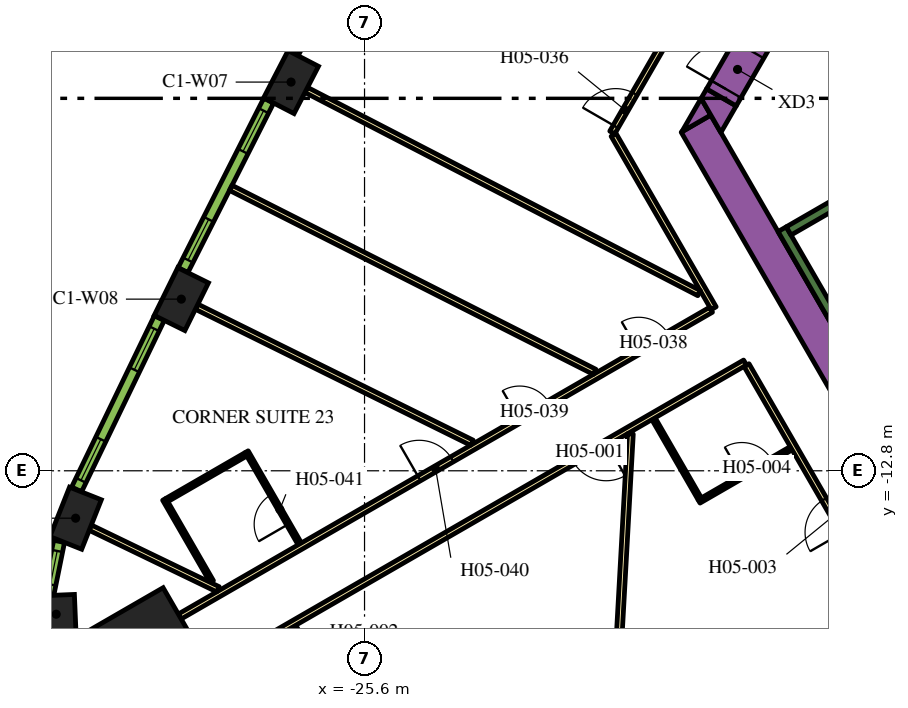
"""IFC4 building model, lengths in metres.
Left out: names, types, materials, properties, quantities, classifications, styles, units other than length and angle.
Written with IfcOpenShell. Run it as: python <this file> out.ifc"""

import sys

from ifc_helpers import new_model, si_unit, direction, frame, frame_2d, origin, origin_2d, place, context, subcontext, project, spatial, polyline, rectangle, outline, extrude, element, fill, save


model = new_model("IFC4")
c1 = context("Model", 3, precision=1e-05, world=origin(), true_north=direction((0.0, 1.0)))
c2 = subcontext(c1, "Body", "Model", "MODEL_VIEW")
j1 = project(units=[si_unit("LENGTHUNIT", "METRE"), si_unit("PLANEANGLEUNIT", "RADIAN")], contexts=[c1])
p1 = place(None, origin())
s1 = spatial("IfcSite", under=j1, at=p1, CompositionType="ELEMENT")
p2 = place(p1, origin())
s2 = spatial("IfcBuilding", under=s1, at=p2, CompositionType="ELEMENT")
p3 = place(p2, frame((0.0, 0.0, 74.4)))
s3 = spatial("IfcBuildingStorey", under=s2, at=p3, CompositionType="ELEMENT", Elevation=74.4)
p4 = place(p3, frame((-31.522, -18.199, 0.0), z_axis=(0.0, 0.0, 1.0), x_axis=(-0.866025403784, -0.5, 0.0)))
e1 = element("IfcColumn", 1, at=p4, inside=s3, PredefinedType="COLUMN", context=c2, shape_type="SweptSolid", body=[
    extrude(rectangle(XDim=3.4, YDim=3.4, at=origin_2d()), origin(), (0.0, 0.0, 1.0), 3.9),
])
for number, where, z_axis, x_axis in (
    (2, (-27.533, -2.572, 0.0), (0.0, 0.0, 1.0), (-0.459, -0.888, 0.0)),
    (3, (-30.421, -8.284, 0.0), (0.0, 0.0, 1.0), (-0.443, -0.897, 0.0)),
    (4, (-33.203, -14.047, 0.0), (0.0, 0.0, 1.0), (-0.369, -0.929, 0.0)),
):
    element("IfcColumn", number, at=place(p3, frame(where, z_axis=z_axis, x_axis=x_axis)), inside=s3, PredefinedType="COLUMN", context=c2, shape_type="SweptSolid", body=[
        extrude(rectangle(XDim=1.4, YDim=0.9, at=origin_2d()), origin(), (0.0, 0.0, 1.0), 3.9),
    ])
p5 = place(p3, frame((-33.713, -16.574, 0.0), z_axis=(0.0, 0.0, 1.0), x_axis=(0.041582693819, -0.999135065732, 0.0)))
e5 = element("IfcColumn", 5, at=p5, inside=s3, PredefinedType="COLUMN", context=c2, shape_type="SweptSolid", body=[
    extrude(rectangle(XDim=1.0, YDim=1.0, at=origin_2d()), origin(), (0.0, 0.0, 1.0), 3.9),
])
p6 = place(p3, frame((-12.134, -11.883, 0.0), z_axis=(0.0, 0.0, 1.0), x_axis=(-0.500005339912, 0.866022320763, 0.0)))
e6 = element("IfcWall", 6, at=p6, inside=s3, PredefinedType="SOLIDWALL", context=c2, shape_type="SweptSolid", body=[
    extrude(rectangle(XDim=9.488, YDim=0.9, at=frame_2d((4.744, 0.0))), origin(), (0.0, 0.0, 1.0), 3.9),
])
p7 = place(p3, origin())
e7 = element("IfcWall", 7, at=p7, inside=s3, PredefinedType="SOLIDWALL", context=c2, shape_type="SweptSolid", body=[
    extrude(outline(polyline([(-16.489, -3.44), (-17.251, -3.88), (-16.743, -3.0), (-16.489, -3.44)])), origin(), (0.0, 0.0, 1.0), 3.9),
])
e8 = element("IfcWall", 8, at=p7, inside=s3, PredefinedType="SOLIDWALL", context=c2, shape_type="SweptSolid", body=[
    extrude(outline(polyline([(-15.82, -3.201), (-16.223, -3.9), (-16.743, -3.0), (-16.599, -2.751), (-15.82, -3.201)])), origin(), (0.0, 0.0, 1.0), 3.9),
])
p8 = place(p3, frame((-12.885, -9.431, 0.0), z_axis=(0.0, 0.0, 1.0), x_axis=(-0.500020560727, 0.866013532718, 0.0)))
e9 = element("IfcWall", 9, at=p8, inside=s3, PredefinedType="SOLIDWALL", context=c2, shape_type="SweptSolid", body=[
    extrude(rectangle(XDim=3.45, YDim=0.25, at=frame_2d((1.725, 0.0))), origin(), (0.0, 0.0, 1.0), 3.9),
])
p9 = place(p3, frame((-14.44, -6.49, 0.0), z_axis=(0.0, 0.0, 1.0), x_axis=(0.866022966069, 0.500004222222, 0.0)))
e10 = element("IfcWall", 10, at=p9, inside=s3, PredefinedType="SOLIDWALL", context=c2, shape_type="SweptSolid", body=[
    extrude(rectangle(XDim=6.8, YDim=0.25, at=frame_2d((3.4, 0.0))), origin(), (0.0, 0.0, 1.0), 3.9),
])
p10 = place(p3, frame((-16.209, -2.976, 0.0), z_axis=(0.0, 0.0, 1.0), x_axis=(0.499954529098, 0.86605165483, 0.0)))
e11 = element("IfcWall", 11, at=p10, inside=s3, PredefinedType="SOLIDWALL", context=c2, shape_type="SweptSolid", body=[
    extrude(rectangle(XDim=1.7, YDim=0.9, at=frame_2d((0.85, 0.0))), origin(), (0.0, 0.0, 1.0), 3.9),
])
p11 = place(p10, frame((0.25, 0.0, 0.0)))
e12 = element("IfcOpeningElement", 12, at=p11, cuts=e11, PredefinedType="OPENING", context=c2, shape_type="SweptSolid", body=[
    extrude(rectangle(XDim=1.2, YDim=2.1, at=frame_2d((0.6, 1.05))), frame((0.0, 0.46, 0.0), z_axis=(0.0, -1.0, 0.0), x_axis=(1.0, 0.0, 0.0)), (0.0, 0.0, 1.0), 0.92),
])
p12 = place(p3, frame((-19.081, -3.9, 0.0), z_axis=(0.0, 0.0, 1.0), x_axis=(0.499998313975, 0.866026377209, 0.0)))
e13 = element("IfcWall", 13, at=p12, inside=s3, PredefinedType="PARTITIONING", context=c2, shape_type="SweptSolid", body=[
    extrude(rectangle(XDim=25.766, YDim=0.15, at=frame_2d((12.883, 0.0))), origin(), (0.0, 0.0, 1.0), 2.7),
])
p13 = place(p12, frame((24.265, 0.0, 0.0)))
e14 = element("IfcOpeningElement", 14, at=p13, cuts=e13, PredefinedType="OPENING", context=c2, shape_type="SweptSolid", body=[
    extrude(rectangle(XDim=1.0, YDim=2.1, at=frame_2d((0.5, 1.05))), frame((0.0, 0.085, 0.0), z_axis=(0.0, -1.0, 0.0), x_axis=(1.0, 0.0, 0.0)), (0.0, 0.0, 1.0), 0.17),
])
p14 = place(p12, frame((13.146, 0.0, 0.0)))
e15 = element("IfcOpeningElement", 15, at=p14, cuts=e13, PredefinedType="OPENING", context=c2, shape_type="SweptSolid", body=[
    extrude(rectangle(XDim=1.1, YDim=2.1, at=frame_2d((0.55, 1.05))), frame((0.0, 0.085, 0.0), z_axis=(0.0, -1.0, 0.0), x_axis=(1.0, 0.0, 0.0)), (0.0, 0.0, 1.0), 0.17),
])
p15 = place(p12, frame((11.693, 0.0, 0.0)))
e16 = element("IfcOpeningElement", 16, at=p15, cuts=e13, PredefinedType="OPENING", context=c2, shape_type="SweptSolid", body=[
    extrude(rectangle(XDim=1.0, YDim=2.1, at=frame_2d((0.5, 1.05))), frame((0.0, 0.085, 0.0), z_axis=(0.0, -1.0, 0.0), x_axis=(1.0, 0.0, 0.0)), (0.0, 0.0, 1.0), 0.17),
])
p16 = place(p12, frame((0.18, 0.0, 0.0)))
e17 = element("IfcOpeningElement", 17, at=p16, cuts=e13, PredefinedType="OPENING", context=c2, shape_type="SweptSolid", body=[
    extrude(rectangle(XDim=1.0, YDim=2.1, at=frame_2d((0.5, 1.05))), frame((0.0, 0.085, 0.0), z_axis=(0.0, -1.0, 0.0), x_axis=(1.0, 0.0, 0.0)), (0.0, 0.0, 1.0), 0.17),
])
p17 = place(p3, frame((-16.412, -8.523, 0.0), z_axis=(0.0, 0.0, 1.0), x_axis=(-0.500001929737, 0.866024289647, 0.0)))
e18 = element("IfcWall", 18, at=p17, inside=s3, PredefinedType="PARTITIONING", context=c2, shape_type="SweptSolid", body=[
    extrude(rectangle(XDim=5.268, YDim=0.15, at=frame_2d((2.634, 0.0))), origin(), (0.0, 0.0, 1.0), 2.7),
])
p18 = place(p3, frame((-30.463, -16.635, 0.0), z_axis=(0.0, 0.0, 1.0), x_axis=(0.866022394896, 0.500005211512, 0.0)))
e19 = element("IfcWall", 19, at=p18, inside=s3, PredefinedType="PARTITIONING", context=c2, shape_type="SweptSolid", body=[
    extrude(rectangle(XDim=16.144, YDim=0.15, at=frame_2d((8.072, 0.0))), origin(), (0.0, 0.0, 1.0), 2.7),
])
p19 = place(p18, frame((13.948, 0.0, 0.0)))
e20 = element("IfcOpeningElement", 20, at=p19, cuts=e19, PredefinedType="OPENING", context=c2, shape_type="SweptSolid", body=[
    extrude(rectangle(XDim=0.9, YDim=2.1, at=frame_2d((0.45, 1.05))), frame((0.0, 0.085, 0.0), z_axis=(0.0, -1.0, 0.0), x_axis=(1.0, 0.0, 0.0)), (0.0, 0.0, 1.0), 0.17),
])
p20 = place(p18, frame((10.329, 0.0, 0.0)))
e21 = element("IfcOpeningElement", 21, at=p20, cuts=e19, PredefinedType="OPENING", context=c2, shape_type="SweptSolid", body=[
    extrude(rectangle(XDim=0.9, YDim=2.1, at=frame_2d((0.45, 1.05))), frame((0.0, 0.085, 0.0), z_axis=(0.0, -1.0, 0.0), x_axis=(1.0, 0.0, 0.0)), (0.0, 0.0, 1.0), 0.17),
])
p21 = place(p18, frame((7.275, 0.0, 0.0)))
e22 = element("IfcOpeningElement", 22, at=p21, cuts=e19, PredefinedType="OPENING", context=c2, shape_type="SweptSolid", body=[
    extrude(rectangle(XDim=1.0, YDim=2.1, at=frame_2d((0.5, 1.05))), frame((0.0, 0.085, 0.0), z_axis=(0.0, -1.0, 0.0), x_axis=(1.0, 0.0, 0.0)), (0.0, 0.0, 1.0), 0.17),
])
p22 = place(p3, frame((-15.587, -9.952, 0.0), z_axis=(0.0, 0.0, 1.0), x_axis=(-0.866022197818, -0.500005552856, 0.0)))
e23 = element("IfcWall", 23, at=p22, inside=s3, PredefinedType="PARTITIONING", context=c2, shape_type="SweptSolid", body=[
    extrude(rectangle(XDim=16.224, YDim=0.15, at=frame_2d((8.112, 0.0))), origin(), (0.0, 0.0, 1.0), 2.7),
])
p23 = place(p22, frame((4.22, 0.0, 0.0)))
e24 = element("IfcOpeningElement", 24, at=p23, cuts=e23, PredefinedType="OPENING", context=c2, shape_type="SweptSolid", body=[
    extrude(rectangle(XDim=1.0, YDim=2.1, at=frame_2d((0.5, 1.05))), frame((0.0, 0.085, 0.0), z_axis=(0.0, -1.0, 0.0), x_axis=(1.0, 0.0, 0.0)), (0.0, 0.0, 1.0), 0.17),
])
p24 = place(p3, frame((-12.918, -14.575, 0.0), z_axis=(0.0, 0.0, 1.0), x_axis=(-0.500009150678, 0.866020120573, 0.0)))
e25 = element("IfcWall", 25, at=p24, inside=s3, PredefinedType="PARTITIONING", context=c2, shape_type="SweptSolid", body=[
    extrude(rectangle(XDim=5.258, YDim=0.15, at=frame_2d((2.629, 0.0))), origin(), (0.0, 0.0, 1.0), 2.7),
])
p25 = place(p24, frame((0.18, 0.0, 0.0)))
e26 = element("IfcOpeningElement", 26, at=p25, cuts=e25, PredefinedType="OPENING", context=c2, shape_type="SweptSolid", body=[
    extrude(rectangle(XDim=1.0, YDim=2.1, at=frame_2d((0.5, 1.05))), frame((0.0, 0.085, 0.0), z_axis=(0.0, -1.0, 0.0), x_axis=(1.0, 0.0, 0.0)), (0.0, 0.0, 1.0), 0.17),
])
p26 = place(p3, frame((-32.817, -14.296, 0.0), z_axis=(0.0, 0.0, 1.0), x_axis=(0.900616957918, -0.434613730927, 0.0)))
e27 = element("IfcWall", 27, at=p26, inside=s3, PredefinedType="PARTITIONING", context=c2, shape_type="SweptSolid", body=[
    extrude(rectangle(XDim=3.733, YDim=0.15, at=frame_2d((1.867, 0.0))), origin(), (0.0, 0.0, 1.0), 2.7),
])
p27 = place(p3, frame((-30.018, -8.483, 0.0), z_axis=(0.0, 0.0, 1.0), x_axis=(0.896544505264, -0.44295366584, 0.0)))
e28 = element("IfcWall", 28, at=p27, inside=s3, PredefinedType="PARTITIONING", context=c2, shape_type="SweptSolid", body=[
    extrude(rectangle(XDim=8.079, YDim=0.15, at=frame_2d((4.04, 0.0))), origin(), (0.0, 0.0, 1.0), 2.7),
])
p28 = place(p3, frame((-29.12, -5.356, 0.0), z_axis=(0.0, 0.0, 1.0), x_axis=(0.892401965553, -0.451241323327, 0.0)))
e29 = element("IfcWall", 29, at=p28, inside=s3, PredefinedType="PARTITIONING", context=c2, shape_type="SweptSolid", body=[
    extrude(rectangle(XDim=10.729, YDim=0.15, at=frame_2d((5.364, 0.0))), origin(), (0.0, 0.0, 1.0), 2.7),
])
p29 = place(p3, frame((-19.198, -22.541, 0.0), z_axis=(0.0, 0.0, 1.0), x_axis=(0.055432210572, 0.99846245299, 0.0)))
e30 = element("IfcWall", 30, at=p29, inside=s3, PredefinedType="PARTITIONING", context=c2, shape_type="SweptSolid", body=[
    extrude(rectangle(XDim=10.729, YDim=0.15, at=frame_2d((5.365, 0.0))), origin(), (0.0, 0.0, 1.0), 2.7),
])
p30 = place(p3, frame((-27.134, -2.779, 0.0), z_axis=(0.0, 0.0, 1.0), x_axis=(0.8882049501, -0.459447457951, 0.0)))
e31 = element("IfcWall", 31, at=p30, inside=s3, PredefinedType="PARTITIONING", context=c2, shape_type="SweptSolid", body=[
    extrude(rectangle(XDim=11.638, YDim=0.15, at=frame_2d((5.819, 0.0))), origin(), (0.0, 0.0, 1.0), 2.7),
])
p31 = place(p3, frame((-26.052, -19.314, 0.0), z_axis=(0.0, 0.0, 1.0), x_axis=(-0.49998411664, 0.866034573852, 0.0)))
e32 = element("IfcWall", 32, at=p31, inside=s3, PredefinedType="PARTITIONING", context=c2, shape_type="SweptSolid", body=[
    extrude(rectangle(XDim=2.8, YDim=0.1, at=frame_2d((1.4, 0.0))), origin(), (0.0, 0.0, 1.0), 2.7),
])
p32 = place(p31, frame((1.3, 0.0, 0.0)))
e33 = element("IfcOpeningElement", 33, at=p32, cuts=e32, PredefinedType="OPENING", context=c2, shape_type="SweptSolid", body=[
    extrude(rectangle(XDim=0.9, YDim=2.1, at=frame_2d((0.45, 1.05))), frame((0.0, 0.06, 0.0), z_axis=(0.0, -1.0, 0.0), x_axis=(1.0, 0.0, 0.0)), (0.0, 0.0, 1.0), 0.12),
])
p33 = place(p3, frame((-16.797, -13.606, 0.0), z_axis=(0.0, 0.0, 1.0), x_axis=(0.866034573852, 0.49998411664, 0.0)))
e34 = element("IfcWall", 34, at=p33, inside=s3, PredefinedType="PARTITIONING", context=c2, shape_type="SweptSolid", body=[
    extrude(rectangle(XDim=2.8, YDim=0.1, at=frame_2d((1.4, 0.0))), origin(), (0.0, 0.0, 1.0), 2.7),
])
p34 = place(p33, frame((1.3, 0.0, 0.0)))
e35 = element("IfcOpeningElement", 35, at=p34, cuts=e34, PredefinedType="OPENING", context=c2, shape_type="SweptSolid", body=[
    extrude(rectangle(XDim=0.9, YDim=2.1, at=frame_2d((0.45, 1.05))), frame((0.0, 0.06, 0.0), z_axis=(0.0, -1.0, 0.0), x_axis=(1.0, 0.0, 0.0)), (0.0, 0.0, 1.0), 0.12),
])
p35 = place(p3, frame((-16.779, -13.538, 0.0), z_axis=(0.0, 0.0, 1.0), x_axis=(-0.500061642096, 0.865989811779, 0.0)))
e36 = element("IfcWall", 36, at=p35, inside=s3, PredefinedType="PARTITIONING", context=c2, shape_type="SweptSolid", body=[
    extrude(rectangle(XDim=2.43, YDim=0.1, at=frame_2d((1.215, 0.0))), origin(), (0.0, 0.0, 1.0), 2.7),
])
p36 = place(p3, frame((-27.304, -14.725, 0.0), z_axis=(0.0, 0.0, 1.0), x_axis=(-0.49998411664, 0.866034573852, 0.0)))
e37 = element("IfcWall", 37, at=p36, inside=s3, PredefinedType="PARTITIONING", context=c2, shape_type="SweptSolid", body=[
    extrude(rectangle(XDim=2.8, YDim=0.1, at=frame_2d((1.4, 0.0))), origin(), (0.0, 0.0, 1.0), 2.7),
])
p37 = place(p36, frame((0.6, 0.0, 0.0)))
e38 = element("IfcOpeningElement", 38, at=p37, cuts=e37, PredefinedType="OPENING", context=c2, shape_type="SweptSolid", body=[
    extrude(rectangle(XDim=0.9, YDim=2.1, at=frame_2d((0.45, 1.05))), frame((0.0, 0.06, 0.0), z_axis=(0.0, -1.0, 0.0), x_axis=(1.0, 0.0, 0.0)), (0.0, 0.0, 1.0), 0.12),
])
p38 = place(p3, frame((-28.722, -12.368, 0.0), z_axis=(0.0, 0.0, 1.0), x_axis=(-0.866050077142, -0.499957262057, 0.0)))
e39 = element("IfcWall", 39, at=p38, inside=s3, PredefinedType="PARTITIONING", context=c2, shape_type="SweptSolid", body=[
    extrude(rectangle(XDim=2.4, YDim=0.1, at=frame_2d((1.2, 0.0))), origin(), (0.0, 0.0, 1.0), 2.7),
])
p39 = place(p3, frame((-29.619, -15.715, 0.0), z_axis=(0.0, 0.0, 1.0), x_axis=(-0.500004234368, 0.866022959057, 0.0)))
e40 = element("IfcWall", 40, at=p39, inside=s3, PredefinedType="PARTITIONING", context=c2, shape_type="SweptSolid", body=[
    extrude(rectangle(XDim=2.5, YDim=0.1, at=frame_2d((1.25, 0.0))), origin(), (0.0, 0.0, 1.0), 2.7),
])
p40 = place(p3, frame((-25.138, 2.608, 0.0), z_axis=(0.0, 0.0, 1.0), x_axis=(-0.467629620899, -0.883924509026, 0.0)))
e41 = element("IfcWall", 41, at=p40, inside=s3, PredefinedType="SOLIDWALL", context=c2, shape_type="SweptSolid", body=[
    extrude(rectangle(XDim=4.998, YDim=0.29, at=frame_2d((2.499, 0.0))), origin(), (0.0, 0.0, 1.0), 3.6),
])
p41 = place(p40, frame((0.297, 0.0, 0.9)))
e42 = element("IfcOpeningElement", 42, at=p41, cuts=e41, PredefinedType="OPENING", context=c2, shape_type="SweptSolid", body=[
    extrude(rectangle(XDim=1.2, YDim=2.15, at=frame_2d((0.6, 1.075))), frame((0.0, 0.155, 0.0), z_axis=(0.0, -1.0, 0.0), x_axis=(1.0, 0.0, 0.0)), (0.0, 0.0, 1.0), 0.31),
])
p42 = place(p40, frame((3.501, 0.0, 0.9)))
e43 = element("IfcOpeningElement", 43, at=p42, cuts=e41, PredefinedType="OPENING", context=c2, shape_type="SweptSolid", body=[
    extrude(rectangle(XDim=1.2, YDim=2.15, at=frame_2d((0.6, 1.075))), frame((0.0, 0.155, 0.0), z_axis=(0.0, -1.0, 0.0), x_axis=(1.0, 0.0, 0.0)), (0.0, 0.0, 1.0), 0.31),
])
p43 = place(p3, frame((-28.122, -3.06, 0.0), z_axis=(0.0, 0.0, 1.0), x_axis=(-0.451233929645, -0.892405704115, 0.0)))
e44 = element("IfcWall", 44, at=p43, inside=s3, PredefinedType="SOLIDWALL", context=c2, shape_type="SweptSolid", body=[
    extrude(rectangle(XDim=4.998, YDim=0.29, at=frame_2d((2.499, 0.0))), origin(), (0.0, 0.0, 1.0), 3.6),
])
p44 = place(p43, frame((0.297, 0.0, 0.9)))
e45 = element("IfcOpeningElement", 45, at=p44, cuts=e44, PredefinedType="OPENING", context=c2, shape_type="SweptSolid", body=[
    extrude(rectangle(XDim=1.2, YDim=2.15, at=frame_2d((0.6, 1.075))), frame((0.0, 0.155, 0.0), z_axis=(0.0, -1.0, 0.0), x_axis=(1.0, 0.0, 0.0)), (0.0, 0.0, 1.0), 0.31),
])
p45 = place(p43, frame((3.501, 0.0, 0.9)))
e46 = element("IfcOpeningElement", 46, at=p45, cuts=e44, PredefinedType="OPENING", context=c2, shape_type="SweptSolid", body=[
    extrude(rectangle(XDim=1.2, YDim=2.15, at=frame_2d((0.6, 1.075))), frame((0.0, 0.155, 0.0), z_axis=(0.0, -1.0, 0.0), x_axis=(1.0, 0.0, 0.0)), (0.0, 0.0, 1.0), 0.31),
])
p46 = place(p3, frame((-31.0, -8.782, 0.0), z_axis=(0.0, 0.0, 1.0), x_axis=(-0.434664499056, -0.900592456808, 0.0)))
e47 = element("IfcWall", 47, at=p46, inside=s3, PredefinedType="SOLIDWALL", context=c2, shape_type="SweptSolid", body=[
    extrude(rectangle(XDim=5.006, YDim=0.29, at=frame_2d((2.503, 0.0))), origin(), (0.0, 0.0, 1.0), 3.6),
])
p47 = place(p46, frame((0.31, 0.0, 0.9)))
e48 = element("IfcOpeningElement", 48, at=p47, cuts=e47, PredefinedType="OPENING", context=c2, shape_type="SweptSolid", body=[
    extrude(rectangle(XDim=1.2, YDim=2.15, at=frame_2d((0.6, 1.075))), frame((0.0, 0.155, 0.0), z_axis=(0.0, -1.0, 0.0), x_axis=(1.0, 0.0, 0.0)), (0.0, 0.0, 1.0), 0.31),
])
p48 = place(p46, frame((3.541, 0.0, 0.9)))
e49 = element("IfcOpeningElement", 49, at=p48, cuts=e47, PredefinedType="OPENING", context=c2, shape_type="SweptSolid", body=[
    extrude(rectangle(XDim=1.2, YDim=2.15, at=frame_2d((0.6, 1.075))), frame((0.0, 0.155, 0.0), z_axis=(0.0, -1.0, 0.0), x_axis=(1.0, 0.0, 0.0)), (0.0, 0.0, 1.0), 0.31),
])
p49 = place(p3, frame((-33.637, -14.657, 0.0), z_axis=(0.0, 0.0, 1.0), x_axis=(-0.198106888228, -0.980180422594, 0.0)))
e50 = element("IfcWall", 50, at=p49, inside=s3, PredefinedType="SOLIDWALL", context=c2, shape_type="SweptSolid", body=[
    extrude(rectangle(XDim=1.415, YDim=0.29, at=frame_2d((0.708, 0.0))), origin(), (0.0, 0.0, 1.0), 3.6),
])
p50 = place(p49, frame((0.257, 0.0, 0.9)))
e51 = element("IfcOpeningElement", 51, at=p50, cuts=e50, PredefinedType="OPENING", context=c2, shape_type="SweptSolid", body=[
    extrude(rectangle(XDim=0.9, YDim=2.15, at=frame_2d((0.45, 1.075))), frame((0.0, 0.155, 0.0), z_axis=(0.0, -1.0, 0.0), x_axis=(1.0, 0.0, 0.0)), (0.0, 0.0, 1.0), 0.31),
])
p51 = place(p11, origin())
e52 = element("IfcDoor", 52, at=p51, inside=s3, OperationType="SINGLE_SWING_LEFT", PredefinedType="DOOR", context=c2, shape_type="SweptSolid", body=[
    extrude(rectangle(XDim=1.2, YDim=2.1, at=frame_2d((0.6, 1.05))), frame((0.0, 0.025, 0.0), z_axis=(0.0, -1.0, 0.0), x_axis=(1.0, 0.0, 0.0)), (0.0, 0.0, 1.0), 0.05),
])
fill(e12, e52)
p52 = place(p23, origin())
e53 = element("IfcDoor", 53, at=p52, inside=s3, OperationType="SINGLE_SWING_LEFT", PredefinedType="DOOR", context=c2, shape_type="SweptSolid", body=[
    extrude(rectangle(XDim=1.0, YDim=2.1, at=frame_2d((0.5, 1.05))), frame((0.0, 0.025, 0.0), z_axis=(0.0, -1.0, 0.0), x_axis=(1.0, 0.0, 0.0)), (0.0, 0.0, 1.0), 0.05),
])
fill(e24, e53)
p53 = place(p25, origin())
e54 = element("IfcDoor", 54, at=p53, inside=s3, OperationType="SINGLE_SWING_LEFT", PredefinedType="DOOR", context=c2, shape_type="SweptSolid", body=[
    extrude(rectangle(XDim=1.0, YDim=2.1, at=frame_2d((0.5, 1.05))), frame((0.0, 0.025, 0.0), z_axis=(0.0, -1.0, 0.0), x_axis=(1.0, 0.0, 0.0)), (0.0, 0.0, 1.0), 0.05),
])
fill(e26, e54)
p54 = place(p34, origin())
e55 = element("IfcDoor", 55, at=p54, inside=s3, OperationType="SINGLE_SWING_LEFT", PredefinedType="DOOR", context=c2, shape_type="SweptSolid", body=[
    extrude(rectangle(XDim=0.9, YDim=2.1, at=frame_2d((0.45, 1.05))), frame((0.0, 0.025, 0.0), z_axis=(0.0, -1.0, 0.0), x_axis=(1.0, 0.0, 0.0)), (0.0, 0.0, 1.0), 0.05),
])
fill(e35, e55)
p55 = place(p16, origin())
e56 = element("IfcDoor", 56, at=p55, inside=s3, OperationType="SINGLE_SWING_LEFT", PredefinedType="DOOR", context=c2, shape_type="SweptSolid", body=[
    extrude(rectangle(XDim=1.0, YDim=2.1, at=frame_2d((0.5, 1.05))), frame((0.0, 0.025, 0.0), z_axis=(0.0, -1.0, 0.0), x_axis=(1.0, 0.0, 0.0)), (0.0, 0.0, 1.0), 0.05),
])
fill(e17, e56)
p56 = place(p19, origin())
e57 = element("IfcDoor", 57, at=p56, inside=s3, OperationType="SINGLE_SWING_LEFT", PredefinedType="DOOR", context=c2, shape_type="SweptSolid", body=[
    extrude(rectangle(XDim=0.9, YDim=2.1, at=frame_2d((0.45, 1.05))), frame((0.0, 0.025, 0.0), z_axis=(0.0, -1.0, 0.0), x_axis=(1.0, 0.0, 0.0)), (0.0, 0.0, 1.0), 0.05),
])
fill(e20, e57)
p57 = place(p20, origin())
e58 = element("IfcDoor", 58, at=p57, inside=s3, OperationType="SINGLE_SWING_RIGHT", PredefinedType="DOOR", context=c2, shape_type="SweptSolid", body=[
    extrude(rectangle(XDim=0.9, YDim=2.1, at=frame_2d((0.45, 1.05))), frame((0.0, 0.025, 0.0), z_axis=(0.0, -1.0, 0.0), x_axis=(1.0, 0.0, 0.0)), (0.0, 0.0, 1.0), 0.05),
])
fill(e21, e58)
p58 = place(p21, origin())
e59 = element("IfcDoor", 59, at=p58, inside=s3, OperationType="SINGLE_SWING_RIGHT", PredefinedType="DOOR", context=c2, shape_type="SweptSolid", body=[
    extrude(rectangle(XDim=1.0, YDim=2.1, at=frame_2d((0.5, 1.05))), frame((0.0, 0.025, 0.0), z_axis=(0.0, -1.0, 0.0), x_axis=(1.0, 0.0, 0.0)), (0.0, 0.0, 1.0), 0.05),
])
fill(e22, e59)
p59 = place(p37, origin())
e60 = element("IfcDoor", 60, at=p59, inside=s3, OperationType="SINGLE_SWING_LEFT", PredefinedType="DOOR", context=c2, shape_type="SweptSolid", body=[
    extrude(rectangle(XDim=0.9, YDim=2.1, at=frame_2d((0.45, 1.05))), frame((0.0, 0.025, 0.0), z_axis=(0.0, -1.0, 0.0), x_axis=(1.0, 0.0, 0.0)), (0.0, 0.0, 1.0), 0.05),
])
fill(e38, e60)
p60 = place(p44, origin())
e61 = element("IfcWindow", 61, at=p60, inside=s3, PartitioningType="DOUBLE_PANEL_VERTICAL", PredefinedType="WINDOW", context=c2, shape_type="SweptSolid", body=[
    extrude(rectangle(XDim=1.2, YDim=2.15, at=frame_2d((0.6, 1.075))), frame((0.0, 0.015, 0.0), z_axis=(0.0, -1.0, 0.0), x_axis=(1.0, 0.0, 0.0)), (0.0, 0.0, 1.0), 0.06),
])
fill(e45, e61)
p61 = place(p45, origin())
e62 = element("IfcWindow", 62, at=p61, inside=s3, PartitioningType="DOUBLE_PANEL_VERTICAL", PredefinedType="WINDOW", context=c2, shape_type="SweptSolid", body=[
    extrude(rectangle(XDim=1.2, YDim=2.15, at=frame_2d((0.6, 1.075))), frame((0.0, 0.015, 0.0), z_axis=(0.0, -1.0, 0.0), x_axis=(1.0, 0.0, 0.0)), (0.0, 0.0, 1.0), 0.06),
])
fill(e46, e62)
p62 = place(p47, origin())
e63 = element("IfcWindow", 63, at=p62, inside=s3, PartitioningType="DOUBLE_PANEL_VERTICAL", PredefinedType="WINDOW", context=c2, shape_type="SweptSolid", body=[
    extrude(rectangle(XDim=1.2, YDim=2.15, at=frame_2d((0.6, 1.075))), frame((0.0, 0.015, 0.0), z_axis=(0.0, -1.0, 0.0), x_axis=(1.0, 0.0, 0.0)), (0.0, 0.0, 1.0), 0.06),
])
fill(e48, e63)
p63 = place(p48, origin())
e64 = element("IfcWindow", 64, at=p63, inside=s3, PartitioningType="DOUBLE_PANEL_VERTICAL", PredefinedType="WINDOW", context=c2, shape_type="SweptSolid", body=[
    extrude(rectangle(XDim=1.2, YDim=2.15, at=frame_2d((0.6, 1.075))), frame((0.0, 0.015, 0.0), z_axis=(0.0, -1.0, 0.0), x_axis=(1.0, 0.0, 0.0)), (0.0, 0.0, 1.0), 0.06),
])
fill(e49, e64)
p64 = place(p50, origin())
e65 = element("IfcWindow", 65, at=p64, inside=s3, PartitioningType="SINGLE_PANEL", PredefinedType="WINDOW", context=c2, shape_type="SweptSolid", body=[
    extrude(rectangle(XDim=0.9, YDim=2.15, at=frame_2d((0.45, 1.075))), frame((0.0, 0.015, 0.0), z_axis=(0.0, -1.0, 0.0), x_axis=(1.0, 0.0, 0.0)), (0.0, 0.0, 1.0), 0.06),
])
fill(e51, e65)
save(model, sys.argv[1])
